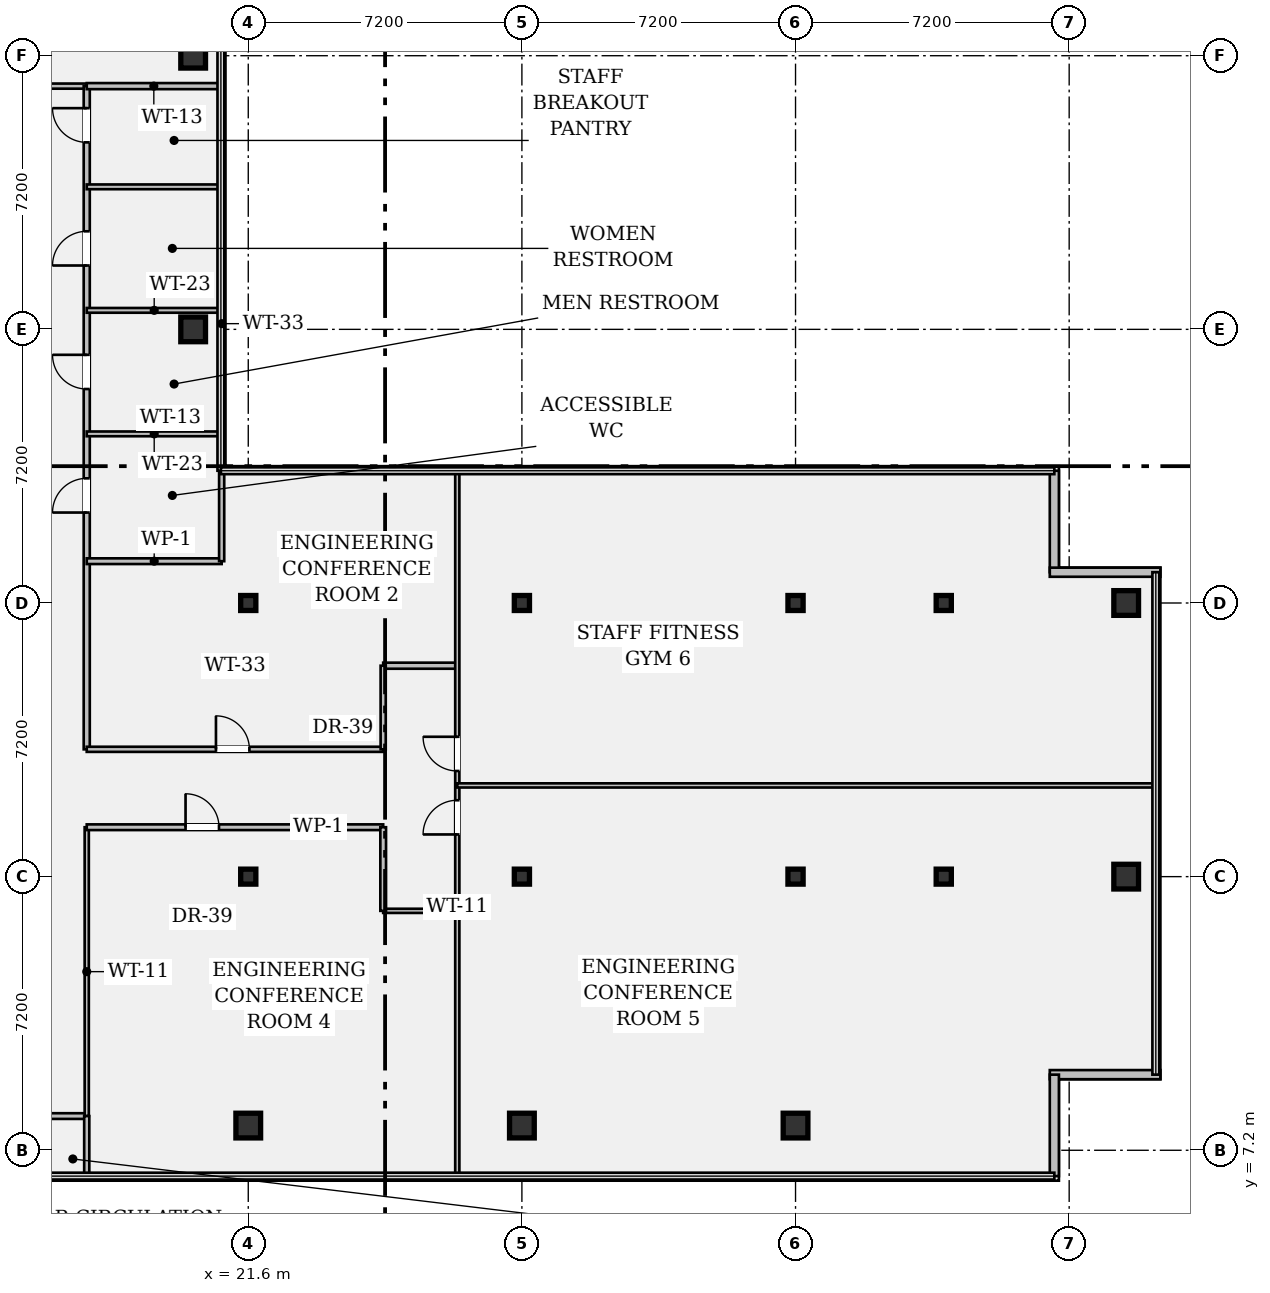
"""IFC4 building model, lengths in metres.
Left out: names, types, materials, properties, quantities, classifications, styles, units other than length and angle.
Written with IfcOpenShell. Run it as: python <this file> out.ifc"""

import sys

from ifc_helpers import new_model, si_unit, direction, frame, frame_2d, origin, origin_2d, place, context, subcontext, project, spatial, rectangle, hollow_rectangle, i_section, extrude, element, fill, save


model = new_model("IFC4")
c1 = context("Model", 3, precision=1e-05, world=origin(), true_north=direction((0.0, 1.0)))
c2 = subcontext(c1, "Body", "Model", "MODEL_VIEW")
j1 = project(units=[si_unit("LENGTHUNIT", "METRE"), si_unit("PLANEANGLEUNIT", "RADIAN")], contexts=[c1])
p1 = place(None, origin())
s1 = spatial("IfcSite", under=j1, at=p1, CompositionType="ELEMENT")
p2 = place(p1, origin())
s2 = spatial("IfcBuilding", under=s1, at=p2, CompositionType="ELEMENT")
p3 = place(p2, frame((0.0, 0.0, 283.15)))
s3 = spatial("IfcBuildingStorey", under=s2, at=p3, CompositionType="ELEMENT", Elevation=283.15)
for number, where, z_axis, x_axis in (
    (1, (20.15, 28.8, 0.0), (0.0, 0.0, 1.0), (1.0, 0.0, 0.0)),
    (2, (20.15, 36.0, 0.0), (0.0, 0.0, 1.0), (1.0, 0.0, 0.0)),
    (3, (21.6, 7.85, 0.0), (0.0, 0.0, 1.0), (1.0, 0.0, 0.0)),
):
    element("IfcColumn", number, at=place(p3, frame(where, z_axis=z_axis, x_axis=x_axis)), inside=s3, PredefinedType="COLUMN", context=c2, shape_type="SweptSolid", body=[
        extrude(hollow_rectangle(XDim=0.65, YDim=0.65, WallThickness=0.04, at=origin_2d()), origin(), (0.0, 0.0, 1.0), 3.24),
    ])
for number, where, z_axis, x_axis in (
    (4, (21.6, 14.4, 0.0), (0.0, 0.0, 1.0), (1.0, 0.0, 0.0)),
    (5, (21.6, 21.6, 0.0), (0.0, 0.0, 1.0), (1.0, 0.0, 0.0)),
):
    element("IfcColumn", number, at=place(p3, frame(where, z_axis=z_axis, x_axis=x_axis)), inside=s3, PredefinedType="COLUMN", context=c2, shape_type="SweptSolid", body=[
        extrude(i_section(OverallWidth=0.399, OverallDepth=0.394, WebThickness=0.023, FlangeThickness=0.037, FilletRadius=0.018, at=origin_2d()), origin(), (0.0, 0.0, 1.0), 3.24),
    ])
p4 = place(p3, frame((28.8, 7.85, 0.0), z_axis=(0.0, 0.0, 1.0), x_axis=(1.0, 0.0, 0.0)))
e6 = element("IfcColumn", 6, at=p4, inside=s3, PredefinedType="COLUMN", context=c2, shape_type="SweptSolid", body=[
    extrude(hollow_rectangle(XDim=0.65, YDim=0.65, WallThickness=0.04, at=origin_2d()), origin(), (0.0, 0.0, 1.0), 3.24),
])
for number, where, z_axis, x_axis in (
    (7, (28.8, 14.4, 0.0), (0.0, 0.0, 1.0), (1.0, 0.0, 0.0)),
    (8, (28.8, 21.6, 0.0), (0.0, 0.0, 1.0), (1.0, 0.0, 0.0)),
):
    element("IfcColumn", number, at=place(p3, frame(where, z_axis=z_axis, x_axis=x_axis)), inside=s3, PredefinedType="COLUMN", context=c2, shape_type="SweptSolid", body=[
        extrude(i_section(OverallWidth=0.399, OverallDepth=0.394, WebThickness=0.023, FlangeThickness=0.037, FilletRadius=0.018, at=origin_2d()), origin(), (0.0, 0.0, 1.0), 3.24),
    ])
p5 = place(p3, frame((36.0, 7.85, 0.0), z_axis=(0.0, 0.0, 1.0), x_axis=(1.0, 0.0, 0.0)))
e9 = element("IfcColumn", 9, at=p5, inside=s3, PredefinedType="COLUMN", context=c2, shape_type="SweptSolid", body=[
    extrude(hollow_rectangle(XDim=0.65, YDim=0.65, WallThickness=0.04, at=origin_2d()), origin(), (0.0, 0.0, 1.0), 3.24),
])
for number, where, z_axis, x_axis in (
    (10, (36.0, 14.4, 0.0), (0.0, 0.0, 1.0), (1.0, 0.0, 0.0)),
    (11, (36.0, 21.6, 0.0), (0.0, 0.0, 1.0), (1.0, 0.0, 0.0)),
    (12, (39.9, 14.4, 0.0), (0.0, 0.0, 1.0), (1.0, 0.0, 0.0)),
    (13, (39.9, 21.6, 0.0), (0.0, 0.0, 1.0), (1.0, 0.0, 0.0)),
):
    element("IfcColumn", number, at=place(p3, frame(where, z_axis=z_axis, x_axis=x_axis)), inside=s3, PredefinedType="COLUMN", context=c2, shape_type="SweptSolid", body=[
        extrude(i_section(OverallWidth=0.399, OverallDepth=0.394, WebThickness=0.023, FlangeThickness=0.037, FilletRadius=0.018, at=origin_2d()), origin(), (0.0, 0.0, 1.0), 3.24),
    ])
for number, where, z_axis, x_axis in (
    (14, (44.7, 14.4, 0.0), (0.0, 0.0, 1.0), (1.0, 0.0, 0.0)),
    (15, (44.7, 21.6, 0.0), (0.0, 0.0, 1.0), (1.0, 0.0, 0.0)),
):
    element("IfcColumn", number, at=place(p3, frame(where, z_axis=z_axis, x_axis=x_axis)), inside=s3, PredefinedType="COLUMN", context=c2, shape_type="SweptSolid", body=[
        extrude(hollow_rectangle(XDim=0.65, YDim=0.65, WallThickness=0.04, at=origin_2d()), origin(), (0.0, 0.0, 1.0), 3.24),
    ])
p6 = place(p3, frame((42.81, 25.08, 0.0), z_axis=(0.0, 0.0, 1.0), x_axis=(0.0, -1.0, 0.0)))
e16 = element("IfcWall", 16, at=p6, inside=s3, PredefinedType="STANDARD", context=c2, shape_type="SweptSolid", body=[
    extrude(rectangle(XDim=2.67, YDim=0.24, at=frame_2d((1.335, 0.0))), origin(), (0.0, 0.0, 1.0), 3.24),
])
for number, where, z_axis, x_axis in (
    (17, (42.69, 22.41, 0.0), (0.0, 0.0, 1.0), (1.0, 0.0, 0.0)),
    (18, (45.6, 9.19, 0.0), (0.0, 0.0, 1.0), (-1.0, 0.0, 0.0)),
):
    element("IfcWall", number, at=place(p3, frame(where, z_axis=z_axis, x_axis=x_axis)), inside=s3, PredefinedType="STANDARD", context=c2, shape_type="SweptSolid", body=[
        extrude(rectangle(XDim=2.91, YDim=0.24, at=frame_2d((1.455, 0.0))), origin(), (0.0, 0.0, 1.0), 3.24),
    ])
p7 = place(p3, frame((42.81, 9.19, 0.0), z_axis=(0.0, 0.0, 1.0), x_axis=(0.0, -1.0, 0.0)))
e19 = element("IfcWall", 19, at=p7, inside=s3, PredefinedType="STANDARD", context=c2, shape_type="SweptSolid", body=[
    extrude(rectangle(XDim=2.67, YDim=0.24, at=frame_2d((1.335, 0.0))), origin(), (0.0, 0.0, 1.0), 3.24),
])
p8 = place(p3, frame((14.4, 8.1, 0.0), z_axis=(0.0, 0.0, 1.0), x_axis=(1.0, 0.0, 0.0)))
e20 = element("IfcWall", 20, at=p8, inside=s3, PredefinedType="PARTITIONING", context=c2, shape_type="SweptSolid", body=[
    extrude(rectangle(XDim=2.95, YDim=0.15, at=frame_2d((1.475, 0.0))), origin(), (0.0, 0.0, 1.0), 3.24),
])
p9 = place(p8, frame((0.95, 0.0, 0.0)))
e21 = element("IfcOpeningElement", 21, at=p9, cuts=e20, PredefinedType="OPENING", context=c2, shape_type="SweptSolid", body=[
    extrude(rectangle(XDim=0.88, YDim=2.15, at=frame_2d((0.44, 1.075))), frame((0.0, 0.087, 0.0), z_axis=(0.0, -1.0, 0.0), x_axis=(1.0, 0.0, 0.0)), (0.0, 0.0, 1.0), 0.174),
])
p10 = place(p3, frame((14.4, 35.2, 0.0), z_axis=(0.0, 0.0, 1.0), x_axis=(1.0, 0.0, 0.0)))
e22 = element("IfcWall", 22, at=p10, inside=s3, PredefinedType="PARTITIONING", context=c2, shape_type="SweptSolid", body=[
    extrude(rectangle(XDim=2.95, YDim=0.135, at=frame_2d((1.475, 0.0))), origin(), (0.0, 0.0, 1.0), 2.808),
])
p11 = place(p10, frame((0.95, 0.0, 0.0)))
e23 = element("IfcOpeningElement", 23, at=p11, cuts=e22, PredefinedType="OPENING", context=c2, shape_type="SweptSolid", body=[
    extrude(rectangle(XDim=1.0, YDim=2.15, at=frame_2d((0.5, 1.075))), frame((0.0, 0.08, 0.0), z_axis=(0.0, -1.0, 0.0), x_axis=(1.0, 0.0, 0.0)), (0.0, 0.0, 1.0), 0.159),
])
p12 = place(p3, frame((17.35, 8.1, 0.0), z_axis=(0.0, 0.0, 1.0), x_axis=(0.0, 1.0, 0.0)))
e24 = element("IfcWall", 24, at=p12, inside=s3, PredefinedType="PARTITIONING", context=c2, shape_type="SweptSolid", body=[
    extrude(rectangle(XDim=7.6, YDim=0.11, at=frame_2d((3.8, 0.0))), origin(), (0.0, 0.0, 1.0), 2.676),
])
p13 = place(p3, frame((17.35, 17.75, 0.0), z_axis=(0.0, 0.0, 1.0), x_axis=(0.0, 1.0, 0.0)))
e25 = element("IfcWall", 25, at=p13, inside=s3, PredefinedType="PARTITIONING", context=c2, shape_type="SweptSolid", body=[
    extrude(rectangle(XDim=17.45, YDim=0.16, at=frame_2d((8.725, 0.0))), origin(), (0.0, 0.0, 1.0), 2.676),
])
p14 = place(p13, frame((6.23, 0.0, 0.0)))
e26 = element("IfcOpeningElement", 26, at=p14, cuts=e25, PredefinedType="OPENING", context=c2, shape_type="SweptSolid", body=[
    extrude(rectangle(XDim=0.9, YDim=2.15, at=frame_2d((0.45, 1.075))), frame((0.0, 0.092, 0.0), z_axis=(0.0, -1.0, 0.0), x_axis=(1.0, 0.0, 0.0)), (0.0, 0.0, 1.0), 0.184),
])
p15 = place(p13, frame((9.48, 0.0, 0.0)))
e27 = element("IfcOpeningElement", 27, at=p15, cuts=e25, PredefinedType="OPENING", context=c2, shape_type="SweptSolid", body=[
    extrude(rectangle(XDim=0.9, YDim=2.15, at=frame_2d((0.45, 1.075))), frame((0.0, 0.092, 0.0), z_axis=(0.0, -1.0, 0.0), x_axis=(1.0, 0.0, 0.0)), (0.0, 0.0, 1.0), 0.184),
])
p16 = place(p13, frame((12.73, 0.0, 0.0)))
e28 = element("IfcOpeningElement", 28, at=p16, cuts=e25, PredefinedType="OPENING", context=c2, shape_type="SweptSolid", body=[
    extrude(rectangle(XDim=0.9, YDim=2.15, at=frame_2d((0.45, 1.075))), frame((0.0, 0.092, 0.0), z_axis=(0.0, -1.0, 0.0), x_axis=(1.0, 0.0, 0.0)), (0.0, 0.0, 1.0), 0.184),
])
p17 = place(p13, frame((15.97, 0.0, 0.0)))
e29 = element("IfcOpeningElement", 29, at=p17, cuts=e25, PredefinedType="OPENING", context=c2, shape_type="SweptSolid", body=[
    extrude(rectangle(XDim=0.9, YDim=2.15, at=frame_2d((0.45, 1.075))), frame((0.0, 0.092, 0.0), z_axis=(0.0, -1.0, 0.0), x_axis=(1.0, 0.0, 0.0)), (0.0, 0.0, 1.0), 0.184),
])
p18 = place(p3, frame((17.35, 15.7, 0.0), z_axis=(0.0, 0.0, 1.0), x_axis=(1.0, 0.0, 0.0)))
e30 = element("IfcWall", 30, at=p18, inside=s3, PredefinedType="PARTITIONING", context=c2, shape_type="SweptSolid", body=[
    extrude(rectangle(XDim=7.8, YDim=0.15, at=frame_2d((3.9, 0.0))), origin(), (0.0, 0.0, 1.0), 2.676),
])
p19 = place(p18, frame((2.6, 0.0, 0.0)))
e31 = element("IfcOpeningElement", 31, at=p19, cuts=e30, PredefinedType="OPENING", context=c2, shape_type="SweptSolid", body=[
    extrude(rectangle(XDim=0.88, YDim=2.15, at=frame_2d((0.44, 1.075))), frame((0.0, 0.087, 0.0), z_axis=(0.0, -1.0, 0.0), x_axis=(1.0, 0.0, 0.0)), (0.0, 0.0, 1.0), 0.174),
])
p20 = place(p3, frame((17.35, 17.75, 0.0), z_axis=(0.0, 0.0, 1.0), x_axis=(1.0, 0.0, 0.0)))
e32 = element("IfcWall", 32, at=p20, inside=s3, PredefinedType="PARTITIONING", context=c2, shape_type="SweptSolid", body=[
    extrude(rectangle(XDim=7.8, YDim=0.135, at=frame_2d((3.9, 0.0))), origin(), (0.0, 0.0, 1.0), 2.676),
])
p21 = place(p20, frame((3.4, 0.0, 0.0)))
e33 = element("IfcOpeningElement", 33, at=p21, cuts=e32, PredefinedType="OPENING", context=c2, shape_type="SweptSolid", body=[
    extrude(rectangle(XDim=0.88, YDim=2.15, at=frame_2d((0.44, 1.075))), frame((0.0, 0.08, 0.0), z_axis=(0.0, -1.0, 0.0), x_axis=(1.0, 0.0, 0.0)), (0.0, 0.0, 1.0), 0.159),
])
p22 = place(p3, frame((25.15, 13.5, 0.0), z_axis=(0.0, 0.0, 1.0), x_axis=(1.0, 0.0, 0.0)))
e34 = element("IfcWall", 34, at=p22, inside=s3, PredefinedType="PARTITIONING", context=c2, shape_type="SweptSolid", body=[
    extrude(rectangle(XDim=1.95, YDim=0.11, at=frame_2d((0.975, 0.0))), origin(), (0.0, 0.0, 1.0), 2.808),
])
p23 = place(p3, frame((25.15, 19.95, 0.0), z_axis=(0.0, 0.0, 1.0), x_axis=(1.0, 0.0, 0.0)))
e35 = element("IfcWall", 35, at=p23, inside=s3, PredefinedType="PARTITIONING", context=c2, shape_type="SweptSolid", body=[
    extrude(rectangle(XDim=1.95, YDim=0.16, at=frame_2d((0.975, 0.0))), origin(), (0.0, 0.0, 1.0), 2.808),
])
p24 = place(p3, frame((25.15, 13.5, 0.0), z_axis=(0.0, 0.0, 1.0), x_axis=(0.0, 1.0, 0.0)))
e36 = element("IfcWall", 36, at=p24, inside=s3, PredefinedType="PARTITIONING", context=c2, shape_type="SweptSolid", body=[
    extrude(rectangle(XDim=2.2, YDim=0.15, at=frame_2d((1.1, 0.0))), origin(), (0.0, 0.0, 1.0), 2.676),
])
p25 = place(p3, frame((25.15, 17.75, 0.0), z_axis=(0.0, 0.0, 1.0), x_axis=(0.0, 1.0, 0.0)))
e37 = element("IfcWall", 37, at=p25, inside=s3, PredefinedType="PARTITIONING", context=c2, shape_type="SweptSolid", body=[
    extrude(rectangle(XDim=2.2, YDim=0.135, at=frame_2d((1.1, 0.0))), origin(), (0.0, 0.0, 1.0), 3.24),
])
p26 = place(p3, frame((27.1, 6.52, 0.0), z_axis=(0.0, 0.0, 1.0), x_axis=(0.0, 1.0, 0.0)))
e38 = element("IfcWall", 38, at=p26, inside=s3, PredefinedType="PARTITIONING", context=c2, shape_type="SweptSolid", body=[
    extrude(rectangle(XDim=18.56, YDim=0.11, at=frame_2d((9.28, 0.0))), origin(), (0.0, 0.0, 1.0), 2.676),
])
p27 = place(p26, frame((8.99, 0.0, 0.0)))
e39 = element("IfcOpeningElement", 39, at=p27, cuts=e38, PredefinedType="OPENING", context=c2, shape_type="SweptSolid", body=[
    extrude(rectangle(XDim=0.9, YDim=2.15, at=frame_2d((0.45, 1.075))), frame((0.0, 0.067, 0.0), z_axis=(0.0, -1.0, 0.0), x_axis=(1.0, 0.0, 0.0)), (0.0, 0.0, 1.0), 0.134),
])
p28 = place(p26, frame((10.66, 0.0, 0.0)))
e40 = element("IfcOpeningElement", 40, at=p28, cuts=e38, PredefinedType="OPENING", context=c2, shape_type="SweptSolid", body=[
    extrude(rectangle(XDim=0.9, YDim=2.15, at=frame_2d((0.45, 1.075))), frame((0.0, 0.067, 0.0), z_axis=(0.0, -1.0, 0.0), x_axis=(1.0, 0.0, 0.0)), (0.0, 0.0, 1.0), 0.134),
])
p29 = place(p3, frame((17.35, 35.2, 0.0), z_axis=(0.0, 0.0, 1.0), x_axis=(1.0, 0.0, 0.0)))
e41 = element("IfcWall", 41, at=p29, inside=s3, PredefinedType="PARTITIONING", context=c2, shape_type="SweptSolid", body=[
    extrude(rectangle(XDim=3.53, YDim=0.16, at=frame_2d((1.765, 0.0))), origin(), (0.0, 0.0, 1.0), 2.808),
])
p30 = place(p3, frame((17.35, 22.7, 0.0), z_axis=(0.0, 0.0, 1.0), x_axis=(1.0, 0.0, 0.0)))
e42 = element("IfcWall", 42, at=p30, inside=s3, PredefinedType="PARTITIONING", context=c2, shape_type="SweptSolid", body=[
    extrude(rectangle(XDim=3.55, YDim=0.15, at=frame_2d((1.775, 0.0))), origin(), (0.0, 0.0, 1.0), 2.808),
])
p31 = place(p3, frame((20.9, 22.7, 0.0), z_axis=(0.0, 0.0, 1.0), x_axis=(0.0, 1.0, 0.0)))
e43 = element("IfcWall", 43, at=p31, inside=s3, PredefinedType="PARTITIONING", context=c2, shape_type="SweptSolid", body=[
    extrude(rectangle(XDim=12.5, YDim=0.135, at=frame_2d((6.25, 0.0))), origin(), (0.0, 0.0, 1.0), 3.24),
])
for number, where, z_axis, x_axis in (
    (44, (17.35, 26.05, 0.0), (0.0, 0.0, 1.0), (1.0, 0.0, 0.0)),
    (45, (17.35, 29.3, 0.0), (0.0, 0.0, 1.0), (1.0, 0.0, 0.0)),
    (46, (17.35, 32.55, 0.0), (0.0, 0.0, 1.0), (1.0, 0.0, 0.0)),
):
    element("IfcWall", number, at=place(p3, frame(where, z_axis=z_axis, x_axis=x_axis)), inside=s3, PredefinedType="PARTITIONING", context=c2, shape_type="SweptSolid", body=[
        extrude(rectangle(XDim=3.55, YDim=0.125, at=frame_2d((1.775, 0.0))), origin(), (0.0, 0.0, 1.0), 2.808),
    ])
p32 = place(p3, frame((17.35, 6.52, 0.0), z_axis=(0.0, 0.0, 1.0), x_axis=(0.0, 1.0, 0.0)))
e47 = element("IfcWall", 47, at=p32, inside=s3, PredefinedType="PARTITIONING", context=c2, shape_type="SweptSolid", body=[
    extrude(rectangle(XDim=1.58, YDim=0.135, at=frame_2d((0.79, 0.0))), origin(), (0.0, 0.0, 1.0), 3.24),
])
p33 = place(p3, frame((27.1, 16.8, 0.0), z_axis=(0.0, 0.0, 1.0), x_axis=(1.0, 0.0, 0.0)))
e48 = element("IfcWall", 48, at=p33, inside=s3, PredefinedType="PARTITIONING", context=c2, shape_type="SweptSolid", body=[
    extrude(rectangle(XDim=18.38, YDim=0.11, at=frame_2d((9.19, 0.0))), origin(), (0.0, 0.0, 1.0), 2.676),
])
p34 = place(p14, origin())
e49 = element("IfcDoor", 49, at=p34, inside=s3, OperationType="SINGLE_SWING_LEFT", PredefinedType="DOOR", context=c2, shape_type="SweptSolid", body=[
    extrude(rectangle(XDim=0.9, YDim=2.15, at=frame_2d((0.45, 1.075))), frame((0.0, 0.025, 0.0), z_axis=(0.0, -1.0, 0.0), x_axis=(1.0, 0.0, 0.0)), (0.0, 0.0, 1.0), 0.05),
])
fill(e26, e49)
p35 = place(p15, origin())
e50 = element("IfcDoor", 50, at=p35, inside=s3, OperationType="SINGLE_SWING_RIGHT", PredefinedType="DOOR", context=c2, shape_type="SweptSolid", body=[
    extrude(rectangle(XDim=0.9, YDim=2.15, at=frame_2d((0.45, 1.075))), frame((0.0, 0.025, 0.0), z_axis=(0.0, -1.0, 0.0), x_axis=(1.0, 0.0, 0.0)), (0.0, 0.0, 1.0), 0.05),
])
fill(e27, e50)
p36 = place(p16, origin())
e51 = element("IfcDoor", 51, at=p36, inside=s3, OperationType="SINGLE_SWING_LEFT", PredefinedType="DOOR", context=c2, shape_type="SweptSolid", body=[
    extrude(rectangle(XDim=0.9, YDim=2.15, at=frame_2d((0.45, 1.075))), frame((0.0, 0.025, 0.0), z_axis=(0.0, -1.0, 0.0), x_axis=(1.0, 0.0, 0.0)), (0.0, 0.0, 1.0), 0.05),
])
fill(e28, e51)
p37 = place(p17, origin())
e52 = element("IfcDoor", 52, at=p37, inside=s3, OperationType="SINGLE_SWING_RIGHT", PredefinedType="DOOR", context=c2, shape_type="SweptSolid", body=[
    extrude(rectangle(XDim=0.9, YDim=2.15, at=frame_2d((0.45, 1.075))), frame((0.0, 0.025, 0.0), z_axis=(0.0, -1.0, 0.0), x_axis=(1.0, 0.0, 0.0)), (0.0, 0.0, 1.0), 0.05),
])
fill(e29, e52)
p38 = place(p21, origin())
e53 = element("IfcDoor", 53, at=p38, inside=s3, OperationType="SINGLE_SWING_LEFT", PredefinedType="DOOR", context=c2, shape_type="SweptSolid", body=[
    extrude(rectangle(XDim=0.88, YDim=2.15, at=frame_2d((0.44, 1.075))), frame((0.0, 0.025, 0.0), z_axis=(0.0, -1.0, 0.0), x_axis=(1.0, 0.0, 0.0)), (0.0, 0.0, 1.0), 0.05),
])
fill(e33, e53)
p39 = place(p19, origin())
e54 = element("IfcDoor", 54, at=p39, inside=s3, OperationType="SINGLE_SWING_LEFT", PredefinedType="DOOR", context=c2, shape_type="SweptSolid", body=[
    extrude(rectangle(XDim=0.88, YDim=2.15, at=frame_2d((0.44, 1.075))), frame((0.0, 0.025, 0.0), z_axis=(0.0, -1.0, 0.0), x_axis=(1.0, 0.0, 0.0)), (0.0, 0.0, 1.0), 0.05),
])
fill(e31, e54)
p40 = place(p27, origin())
e55 = element("IfcDoor", 55, at=p40, inside=s3, OperationType="SINGLE_SWING_LEFT", PredefinedType="DOOR", context=c2, shape_type="SweptSolid", body=[
    extrude(rectangle(XDim=0.9, YDim=2.15, at=frame_2d((0.45, 1.075))), frame((0.0, 0.025, 0.0), z_axis=(0.0, -1.0, 0.0), x_axis=(1.0, 0.0, 0.0)), (0.0, 0.0, 1.0), 0.05),
])
fill(e39, e55)
p41 = place(p28, origin())
e56 = element("IfcDoor", 56, at=p41, inside=s3, OperationType="SINGLE_SWING_RIGHT", PredefinedType="DOOR", context=c2, shape_type="SweptSolid", body=[
    extrude(rectangle(XDim=0.9, YDim=2.15, at=frame_2d((0.45, 1.075))), frame((0.0, 0.025, 0.0), z_axis=(0.0, -1.0, 0.0), x_axis=(1.0, 0.0, 0.0)), (0.0, 0.0, 1.0), 0.05),
])
fill(e40, e56)
save(model, sys.argv[1])
